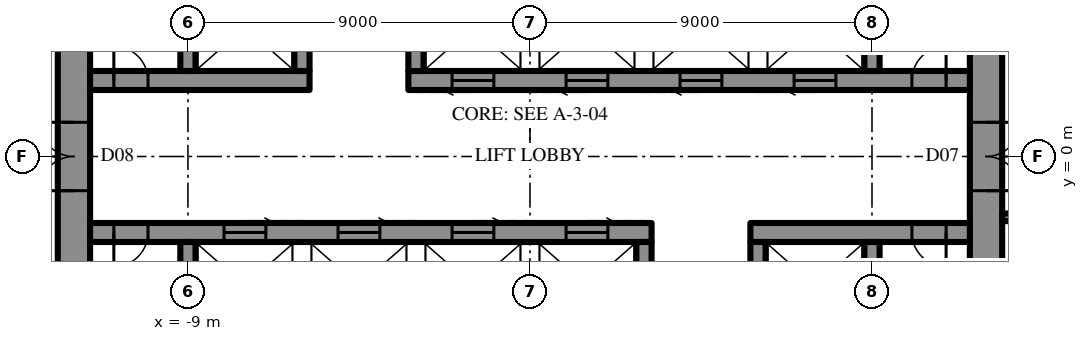
"""IFC4 building model, lengths in metres.
Left out: names, types, materials, properties, quantities, classifications, styles, units other than length and angle.
Written with IfcOpenShell. Run it as: python <this file> out.ifc"""

import sys

from ifc_helpers import new_model, si_unit, direction, frame, frame_2d, origin, place, context, subcontext, project, spatial, rectangle, extrude, element, fill, save


model = new_model("IFC4")
c1 = context("Model", 3, precision=1e-05, world=origin(), true_north=direction((0.0, 1.0)))
c2 = subcontext(c1, "Body", "Model", "MODEL_VIEW")
j1 = project(units=[si_unit("LENGTHUNIT", "METRE"), si_unit("PLANEANGLEUNIT", "RADIAN")], contexts=[c1])
p1 = place(None, origin())
s1 = spatial("IfcSite", under=j1, at=p1, CompositionType="ELEMENT")
p2 = place(p1, origin())
s2 = spatial("IfcBuilding", under=s1, at=p2, CompositionType="ELEMENT")
p3 = place(p2, frame((0.0, 0.0, 349.3)))
s3 = spatial("IfcBuildingStorey", under=s2, at=p3, CompositionType="ELEMENT", Elevation=349.3)
p4 = place(p3, frame((12.0, -10.7, 0.0), z_axis=(0.0, 0.0, 1.0), x_axis=(0.0, 1.0, 0.0)))
e1 = element("IfcWall", 1, at=p4, inside=s3, PredefinedType="SHEAR", context=c2, shape_type="SweptSolid", body=[
    extrude(rectangle(XDim=21.4, YDim=0.85, at=frame_2d((10.7, 0.0))), origin(), (0.0, 0.0, 1.0), 4.2),
])
p5 = place(p4, frame((9.8, 0.0, 0.0)))
e2 = element("IfcOpeningElement", 2, at=p5, cuts=e1, PredefinedType="OPENING", context=c2, shape_type="SweptSolid", body=[
    extrude(rectangle(XDim=1.8, YDim=2.4, at=frame_2d((0.9, 1.2))), frame((0.0, 0.435, 0.0), z_axis=(0.0, -1.0, 0.0), x_axis=(1.0, 0.0, 0.0)), (0.0, 0.0, 1.0), 0.87),
])
p6 = place(p3, frame((-12.0, 10.7, 0.0), z_axis=(0.0, 0.0, 1.0), x_axis=(0.0, -1.0, 0.0)))
e3 = element("IfcWall", 3, at=p6, inside=s3, PredefinedType="SHEAR", context=c2, shape_type="SweptSolid", body=[
    extrude(rectangle(XDim=21.4, YDim=0.85, at=frame_2d((10.7, 0.0))), origin(), (0.0, 0.0, 1.0), 4.2),
])
p7 = place(p6, frame((9.8, 0.0, 0.0)))
e4 = element("IfcOpeningElement", 4, at=p7, cuts=e3, PredefinedType="OPENING", context=c2, shape_type="SweptSolid", body=[
    extrude(rectangle(XDim=1.8, YDim=2.4, at=frame_2d((0.9, 1.2))), frame((0.0, 0.435, 0.0), z_axis=(0.0, -1.0, 0.0), x_axis=(1.0, 0.0, 0.0)), (0.0, 0.0, 1.0), 0.87),
])
p8 = place(p3, frame((-11.575, 2.0, 0.0), z_axis=(0.0, 0.0, 1.0), x_axis=(1.0, 0.0, 0.0)))
e5 = element("IfcWall", 5, at=p8, inside=s3, PredefinedType="SHEAR", context=c2, shape_type="SweptSolid", body=[
    extrude(rectangle(XDim=5.775, YDim=0.5, at=frame_2d((2.887, 0.0))), origin(), (0.0, 0.0, 1.0), 4.2),
])
p9 = place(p8, frame((0.625, 0.0, 0.0)))
e6 = element("IfcOpeningElement", 6, at=p9, cuts=e5, PredefinedType="OPENING", context=c2, shape_type="SweptSolid", body=[
    extrude(rectangle(XDim=0.9, YDim=2.2, at=frame_2d((0.45, 1.1))), frame((0.0, 0.26, 0.0), z_axis=(0.0, -1.0, 0.0), x_axis=(1.0, 0.0, 0.0)), (0.0, 0.0, 1.0), 0.52),
])
p10 = place(p3, frame((-3.2, 2.0, 0.0), z_axis=(0.0, 0.0, 1.0), x_axis=(1.0, 0.0, 0.0)))
e7 = element("IfcWall", 7, at=p10, inside=s3, PredefinedType="SHEAR", context=c2, shape_type="SweptSolid", body=[
    extrude(rectangle(XDim=14.775, YDim=0.5, at=frame_2d((7.387, 0.0))), origin(), (0.0, 0.0, 1.0), 4.2),
])
p11 = place(p10, frame((13.25, 0.0, 0.0)))
e8 = element("IfcOpeningElement", 8, at=p11, cuts=e7, PredefinedType="OPENING", context=c2, shape_type="SweptSolid", body=[
    extrude(rectangle(XDim=0.9, YDim=2.2, at=frame_2d((0.45, 1.1))), frame((0.0, 0.26, 0.0), z_axis=(0.0, -1.0, 0.0), x_axis=(1.0, 0.0, 0.0)), (0.0, 0.0, 1.0), 0.52),
])
p12 = place(p10, frame((1.15, 0.0, 0.0)))
e9 = element("IfcOpeningElement", 9, at=p12, cuts=e7, PredefinedType="OPENING", context=c2, shape_type="SweptSolid", body=[
    extrude(rectangle(XDim=1.1, YDim=2.2, at=frame_2d((0.55, 1.1))), frame((0.0, 0.26, 0.0), z_axis=(0.0, -1.0, 0.0), x_axis=(1.0, 0.0, 0.0)), (0.0, 0.0, 1.0), 0.52),
])
p13 = place(p10, frame((4.15, 0.0, 0.0)))
e10 = element("IfcOpeningElement", 10, at=p13, cuts=e7, PredefinedType="OPENING", context=c2, shape_type="SweptSolid", body=[
    extrude(rectangle(XDim=1.1, YDim=2.2, at=frame_2d((0.55, 1.1))), frame((0.0, 0.26, 0.0), z_axis=(0.0, -1.0, 0.0), x_axis=(1.0, 0.0, 0.0)), (0.0, 0.0, 1.0), 0.52),
])
p14 = place(p10, frame((7.15, 0.0, 0.0)))
e11 = element("IfcOpeningElement", 11, at=p14, cuts=e7, PredefinedType="OPENING", context=c2, shape_type="SweptSolid", body=[
    extrude(rectangle(XDim=1.1, YDim=2.2, at=frame_2d((0.55, 1.1))), frame((0.0, 0.26, 0.0), z_axis=(0.0, -1.0, 0.0), x_axis=(1.0, 0.0, 0.0)), (0.0, 0.0, 1.0), 0.52),
])
p15 = place(p10, frame((10.15, 0.0, 0.0)))
e12 = element("IfcOpeningElement", 12, at=p15, cuts=e7, PredefinedType="OPENING", context=c2, shape_type="SweptSolid", body=[
    extrude(rectangle(XDim=1.1, YDim=2.2, at=frame_2d((0.55, 1.1))), frame((0.0, 0.26, 0.0), z_axis=(0.0, -1.0, 0.0), x_axis=(1.0, 0.0, 0.0)), (0.0, 0.0, 1.0), 0.52),
])
for number, where, z_axis, x_axis in (
    (13, (-9.0, 2.25, 0.0), (0.0, 0.0, 1.0), (0.0, 1.0, 0.0)),
    (14, (-6.0, 2.25, 0.0), (0.0, 0.0, 1.0), (0.0, 1.0, 0.0)),
    (15, (-3.0, 2.25, 0.0), (0.0, 0.0, 1.0), (0.0, 1.0, 0.0)),
    (16, (9.0, 2.25, 0.0), (0.0, 0.0, 1.0), (0.0, 1.0, 0.0)),
):
    element("IfcWall", number, at=place(p3, frame(where, z_axis=z_axis, x_axis=x_axis)), inside=s3, PredefinedType="SHEAR", context=c2, shape_type="SweptSolid", body=[
        extrude(rectangle(XDim=2.3, YDim=0.4, at=frame_2d((1.15, 0.0))), origin(), (0.0, 0.0, 1.0), 4.2),
    ])
p16 = place(p3, frame((11.575, -2.0, 0.0), z_axis=(0.0, 0.0, 1.0), x_axis=(-1.0, 0.0, 0.0)))
e17 = element("IfcWall", 17, at=p16, inside=s3, PredefinedType="SHEAR", context=c2, shape_type="SweptSolid", body=[
    extrude(rectangle(XDim=5.775, YDim=0.5, at=frame_2d((2.887, 0.0))), origin(), (0.0, 0.0, 1.0), 4.2),
])
p17 = place(p16, frame((0.625, 0.0, 0.0)))
e18 = element("IfcOpeningElement", 18, at=p17, cuts=e17, PredefinedType="OPENING", context=c2, shape_type="SweptSolid", body=[
    extrude(rectangle(XDim=0.9, YDim=2.2, at=frame_2d((0.45, 1.1))), frame((0.0, 0.26, 0.0), z_axis=(0.0, -1.0, 0.0), x_axis=(1.0, 0.0, 0.0)), (0.0, 0.0, 1.0), 0.52),
])
p18 = place(p3, frame((3.2, -2.0, 0.0), z_axis=(0.0, 0.0, 1.0), x_axis=(-1.0, 0.0, 0.0)))
e19 = element("IfcWall", 19, at=p18, inside=s3, PredefinedType="SHEAR", context=c2, shape_type="SweptSolid", body=[
    extrude(rectangle(XDim=14.775, YDim=0.5, at=frame_2d((7.387, 0.0))), origin(), (0.0, 0.0, 1.0), 4.2),
])
p19 = place(p18, frame((13.25, 0.0, 0.0)))
e20 = element("IfcOpeningElement", 20, at=p19, cuts=e19, PredefinedType="OPENING", context=c2, shape_type="SweptSolid", body=[
    extrude(rectangle(XDim=0.9, YDim=2.2, at=frame_2d((0.45, 1.1))), frame((0.0, 0.26, 0.0), z_axis=(0.0, -1.0, 0.0), x_axis=(1.0, 0.0, 0.0)), (0.0, 0.0, 1.0), 0.52),
])
p20 = place(p18, frame((1.15, 0.0, 0.0)))
e21 = element("IfcOpeningElement", 21, at=p20, cuts=e19, PredefinedType="OPENING", context=c2, shape_type="SweptSolid", body=[
    extrude(rectangle(XDim=1.1, YDim=2.2, at=frame_2d((0.55, 1.1))), frame((0.0, 0.26, 0.0), z_axis=(0.0, -1.0, 0.0), x_axis=(1.0, 0.0, 0.0)), (0.0, 0.0, 1.0), 0.52),
])
p21 = place(p18, frame((4.15, 0.0, 0.0)))
e22 = element("IfcOpeningElement", 22, at=p21, cuts=e19, PredefinedType="OPENING", context=c2, shape_type="SweptSolid", body=[
    extrude(rectangle(XDim=1.1, YDim=2.2, at=frame_2d((0.55, 1.1))), frame((0.0, 0.26, 0.0), z_axis=(0.0, -1.0, 0.0), x_axis=(1.0, 0.0, 0.0)), (0.0, 0.0, 1.0), 0.52),
])
p22 = place(p18, frame((7.15, 0.0, 0.0)))
e23 = element("IfcOpeningElement", 23, at=p22, cuts=e19, PredefinedType="OPENING", context=c2, shape_type="SweptSolid", body=[
    extrude(rectangle(XDim=1.1, YDim=2.2, at=frame_2d((0.55, 1.1))), frame((0.0, 0.26, 0.0), z_axis=(0.0, -1.0, 0.0), x_axis=(1.0, 0.0, 0.0)), (0.0, 0.0, 1.0), 0.52),
])
p23 = place(p18, frame((10.15, 0.0, 0.0)))
e24 = element("IfcOpeningElement", 24, at=p23, cuts=e19, PredefinedType="OPENING", context=c2, shape_type="SweptSolid", body=[
    extrude(rectangle(XDim=1.1, YDim=2.2, at=frame_2d((0.55, 1.1))), frame((0.0, 0.26, 0.0), z_axis=(0.0, -1.0, 0.0), x_axis=(1.0, 0.0, 0.0)), (0.0, 0.0, 1.0), 0.52),
])
for number, where, z_axis, x_axis in (
    (25, (9.0, -2.25, 0.0), (0.0, 0.0, 1.0), (0.0, -1.0, 0.0)),
    (26, (6.0, -2.25, 0.0), (0.0, 0.0, 1.0), (0.0, -1.0, 0.0)),
    (27, (3.0, -2.25, 0.0), (0.0, 0.0, 1.0), (0.0, -1.0, 0.0)),
    (28, (-9.0, -2.25, 0.0), (0.0, 0.0, 1.0), (0.0, -1.0, 0.0)),
):
    element("IfcWall", number, at=place(p3, frame(where, z_axis=z_axis, x_axis=x_axis)), inside=s3, PredefinedType="SHEAR", context=c2, shape_type="SweptSolid", body=[
        extrude(rectangle(XDim=2.3, YDim=0.4, at=frame_2d((1.15, 0.0))), origin(), (0.0, 0.0, 1.0), 4.2),
    ])
p24 = place(p3, frame((12.425, -1.6, 0.0), z_axis=(0.0, 0.0, 1.0), x_axis=(1.0, 0.0, 0.0)))
e29 = element("IfcWall", 29, at=p24, inside=s3, PredefinedType="PARTITIONING", context=c2, shape_type="SweptSolid", body=[
    extrude(rectangle(XDim=16.5, YDim=0.2, at=frame_2d((8.25, 0.0))), origin(), (0.0, 0.0, 1.0), 4.0),
])
p25 = place(p24, frame((1.15, 0.0, 0.0)))
e30 = element("IfcOpeningElement", 30, at=p25, cuts=e29, PredefinedType="OPENING", context=c2, shape_type="SweptSolid", body=[
    extrude(rectangle(XDim=1.0, YDim=2.2, at=frame_2d((0.5, 1.1))), frame((0.0, 0.11, 0.0), z_axis=(0.0, -1.0, 0.0), x_axis=(1.0, 0.0, 0.0)), (0.0, 0.0, 1.0), 0.22),
])
p26 = place(p5, frame((1.8, 0.0, 0.0), z_axis=(0.0, 0.0, 1.0), x_axis=(-1.0, 0.0, 0.0)))
e31 = element("IfcDoor", 31, at=p26, inside=s3, OperationType="DOUBLE_DOOR_SINGLE_SWING", PredefinedType="DOOR", context=c2, shape_type="SweptSolid", body=[
    extrude(rectangle(XDim=1.8, YDim=2.4, at=frame_2d((0.9, 1.2))), frame((0.0, 0.025, 0.0), z_axis=(0.0, -1.0, 0.0), x_axis=(1.0, 0.0, 0.0)), (0.0, 0.0, 1.0), 0.05),
])
fill(e2, e31)
p27 = place(p7, frame((1.8, 0.0, 0.0), z_axis=(0.0, 0.0, 1.0), x_axis=(-1.0, 0.0, 0.0)))
e32 = element("IfcDoor", 32, at=p27, inside=s3, OperationType="DOUBLE_DOOR_SINGLE_SWING", PredefinedType="DOOR", context=c2, shape_type="SweptSolid", body=[
    extrude(rectangle(XDim=1.8, YDim=2.4, at=frame_2d((0.9, 1.2))), frame((0.0, 0.025, 0.0), z_axis=(0.0, -1.0, 0.0), x_axis=(1.0, 0.0, 0.0)), (0.0, 0.0, 1.0), 0.05),
])
fill(e4, e32)
p28 = place(p9, origin())
e33 = element("IfcDoor", 33, at=p28, inside=s3, OperationType="SINGLE_SWING_RIGHT", PredefinedType="DOOR", context=c2, shape_type="SweptSolid", body=[
    extrude(rectangle(XDim=0.9, YDim=2.2, at=frame_2d((0.45, 1.1))), frame((0.0, 0.025, 0.0), z_axis=(0.0, -1.0, 0.0), x_axis=(1.0, 0.0, 0.0)), (0.0, 0.0, 1.0), 0.05),
])
fill(e6, e33)
p29 = place(p11, origin())
e34 = element("IfcDoor", 34, at=p29, inside=s3, OperationType="SINGLE_SWING_LEFT", PredefinedType="DOOR", context=c2, shape_type="SweptSolid", body=[
    extrude(rectangle(XDim=0.9, YDim=2.2, at=frame_2d((0.45, 1.1))), frame((0.0, 0.025, 0.0), z_axis=(0.0, -1.0, 0.0), x_axis=(1.0, 0.0, 0.0)), (0.0, 0.0, 1.0), 0.05),
])
fill(e8, e34)
p30 = place(p17, origin())
e35 = element("IfcDoor", 35, at=p30, inside=s3, OperationType="SINGLE_SWING_RIGHT", PredefinedType="DOOR", context=c2, shape_type="SweptSolid", body=[
    extrude(rectangle(XDim=0.9, YDim=2.2, at=frame_2d((0.45, 1.1))), frame((0.0, 0.025, 0.0), z_axis=(0.0, -1.0, 0.0), x_axis=(1.0, 0.0, 0.0)), (0.0, 0.0, 1.0), 0.05),
])
fill(e18, e35)
p31 = place(p19, origin())
e36 = element("IfcDoor", 36, at=p31, inside=s3, OperationType="SINGLE_SWING_LEFT", PredefinedType="DOOR", context=c2, shape_type="SweptSolid", body=[
    extrude(rectangle(XDim=0.9, YDim=2.2, at=frame_2d((0.45, 1.1))), frame((0.0, 0.025, 0.0), z_axis=(0.0, -1.0, 0.0), x_axis=(1.0, 0.0, 0.0)), (0.0, 0.0, 1.0), 0.05),
])
fill(e20, e36)
p32 = place(p12, frame((1.1, 0.0, 0.0), z_axis=(0.0, 0.0, 1.0), x_axis=(-1.0, 0.0, 0.0)))
e37 = element("IfcDoor", 37, at=p32, inside=s3, OperationType="SLIDING_TO_LEFT", PredefinedType="DOOR", context=c2, shape_type="SweptSolid", body=[
    extrude(rectangle(XDim=1.1, YDim=2.2, at=frame_2d((0.55, 1.1))), frame((0.0, 0.025, 0.0), z_axis=(0.0, -1.0, 0.0), x_axis=(1.0, 0.0, 0.0)), (0.0, 0.0, 1.0), 0.05),
])
fill(e9, e37)
p33 = place(p13, frame((1.1, 0.0, 0.0), z_axis=(0.0, 0.0, 1.0), x_axis=(-1.0, 0.0, 0.0)))
e38 = element("IfcDoor", 38, at=p33, inside=s3, OperationType="SLIDING_TO_LEFT", PredefinedType="DOOR", context=c2, shape_type="SweptSolid", body=[
    extrude(rectangle(XDim=1.1, YDim=2.2, at=frame_2d((0.55, 1.1))), frame((0.0, 0.025, 0.0), z_axis=(0.0, -1.0, 0.0), x_axis=(1.0, 0.0, 0.0)), (0.0, 0.0, 1.0), 0.05),
])
fill(e10, e38)
p34 = place(p14, frame((1.1, 0.0, 0.0), z_axis=(0.0, 0.0, 1.0), x_axis=(-1.0, 0.0, 0.0)))
e39 = element("IfcDoor", 39, at=p34, inside=s3, OperationType="SLIDING_TO_LEFT", PredefinedType="DOOR", context=c2, shape_type="SweptSolid", body=[
    extrude(rectangle(XDim=1.1, YDim=2.2, at=frame_2d((0.55, 1.1))), frame((0.0, 0.025, 0.0), z_axis=(0.0, -1.0, 0.0), x_axis=(1.0, 0.0, 0.0)), (0.0, 0.0, 1.0), 0.05),
])
fill(e11, e39)
p35 = place(p15, frame((1.1, 0.0, 0.0), z_axis=(0.0, 0.0, 1.0), x_axis=(-1.0, 0.0, 0.0)))
e40 = element("IfcDoor", 40, at=p35, inside=s3, OperationType="SLIDING_TO_LEFT", PredefinedType="DOOR", context=c2, shape_type="SweptSolid", body=[
    extrude(rectangle(XDim=1.1, YDim=2.2, at=frame_2d((0.55, 1.1))), frame((0.0, 0.025, 0.0), z_axis=(0.0, -1.0, 0.0), x_axis=(1.0, 0.0, 0.0)), (0.0, 0.0, 1.0), 0.05),
])
fill(e12, e40)
p36 = place(p20, frame((1.1, 0.0, 0.0), z_axis=(0.0, 0.0, 1.0), x_axis=(-1.0, 0.0, 0.0)))
e41 = element("IfcDoor", 41, at=p36, inside=s3, OperationType="SLIDING_TO_LEFT", PredefinedType="DOOR", context=c2, shape_type="SweptSolid", body=[
    extrude(rectangle(XDim=1.1, YDim=2.2, at=frame_2d((0.55, 1.1))), frame((0.0, 0.025, 0.0), z_axis=(0.0, -1.0, 0.0), x_axis=(1.0, 0.0, 0.0)), (0.0, 0.0, 1.0), 0.05),
])
fill(e21, e41)
p37 = place(p21, frame((1.1, 0.0, 0.0), z_axis=(0.0, 0.0, 1.0), x_axis=(-1.0, 0.0, 0.0)))
e42 = element("IfcDoor", 42, at=p37, inside=s3, OperationType="SLIDING_TO_LEFT", PredefinedType="DOOR", context=c2, shape_type="SweptSolid", body=[
    extrude(rectangle(XDim=1.1, YDim=2.2, at=frame_2d((0.55, 1.1))), frame((0.0, 0.025, 0.0), z_axis=(0.0, -1.0, 0.0), x_axis=(1.0, 0.0, 0.0)), (0.0, 0.0, 1.0), 0.05),
])
fill(e22, e42)
p38 = place(p22, frame((1.1, 0.0, 0.0), z_axis=(0.0, 0.0, 1.0), x_axis=(-1.0, 0.0, 0.0)))
e43 = element("IfcDoor", 43, at=p38, inside=s3, OperationType="SLIDING_TO_LEFT", PredefinedType="DOOR", context=c2, shape_type="SweptSolid", body=[
    extrude(rectangle(XDim=1.1, YDim=2.2, at=frame_2d((0.55, 1.1))), frame((0.0, 0.025, 0.0), z_axis=(0.0, -1.0, 0.0), x_axis=(1.0, 0.0, 0.0)), (0.0, 0.0, 1.0), 0.05),
])
fill(e23, e43)
p39 = place(p23, frame((1.1, 0.0, 0.0), z_axis=(0.0, 0.0, 1.0), x_axis=(-1.0, 0.0, 0.0)))
e44 = element("IfcDoor", 44, at=p39, inside=s3, OperationType="SLIDING_TO_LEFT", PredefinedType="DOOR", context=c2, shape_type="SweptSolid", body=[
    extrude(rectangle(XDim=1.1, YDim=2.2, at=frame_2d((0.55, 1.1))), frame((0.0, 0.025, 0.0), z_axis=(0.0, -1.0, 0.0), x_axis=(1.0, 0.0, 0.0)), (0.0, 0.0, 1.0), 0.05),
])
fill(e24, e44)
save(model, sys.argv[1])
